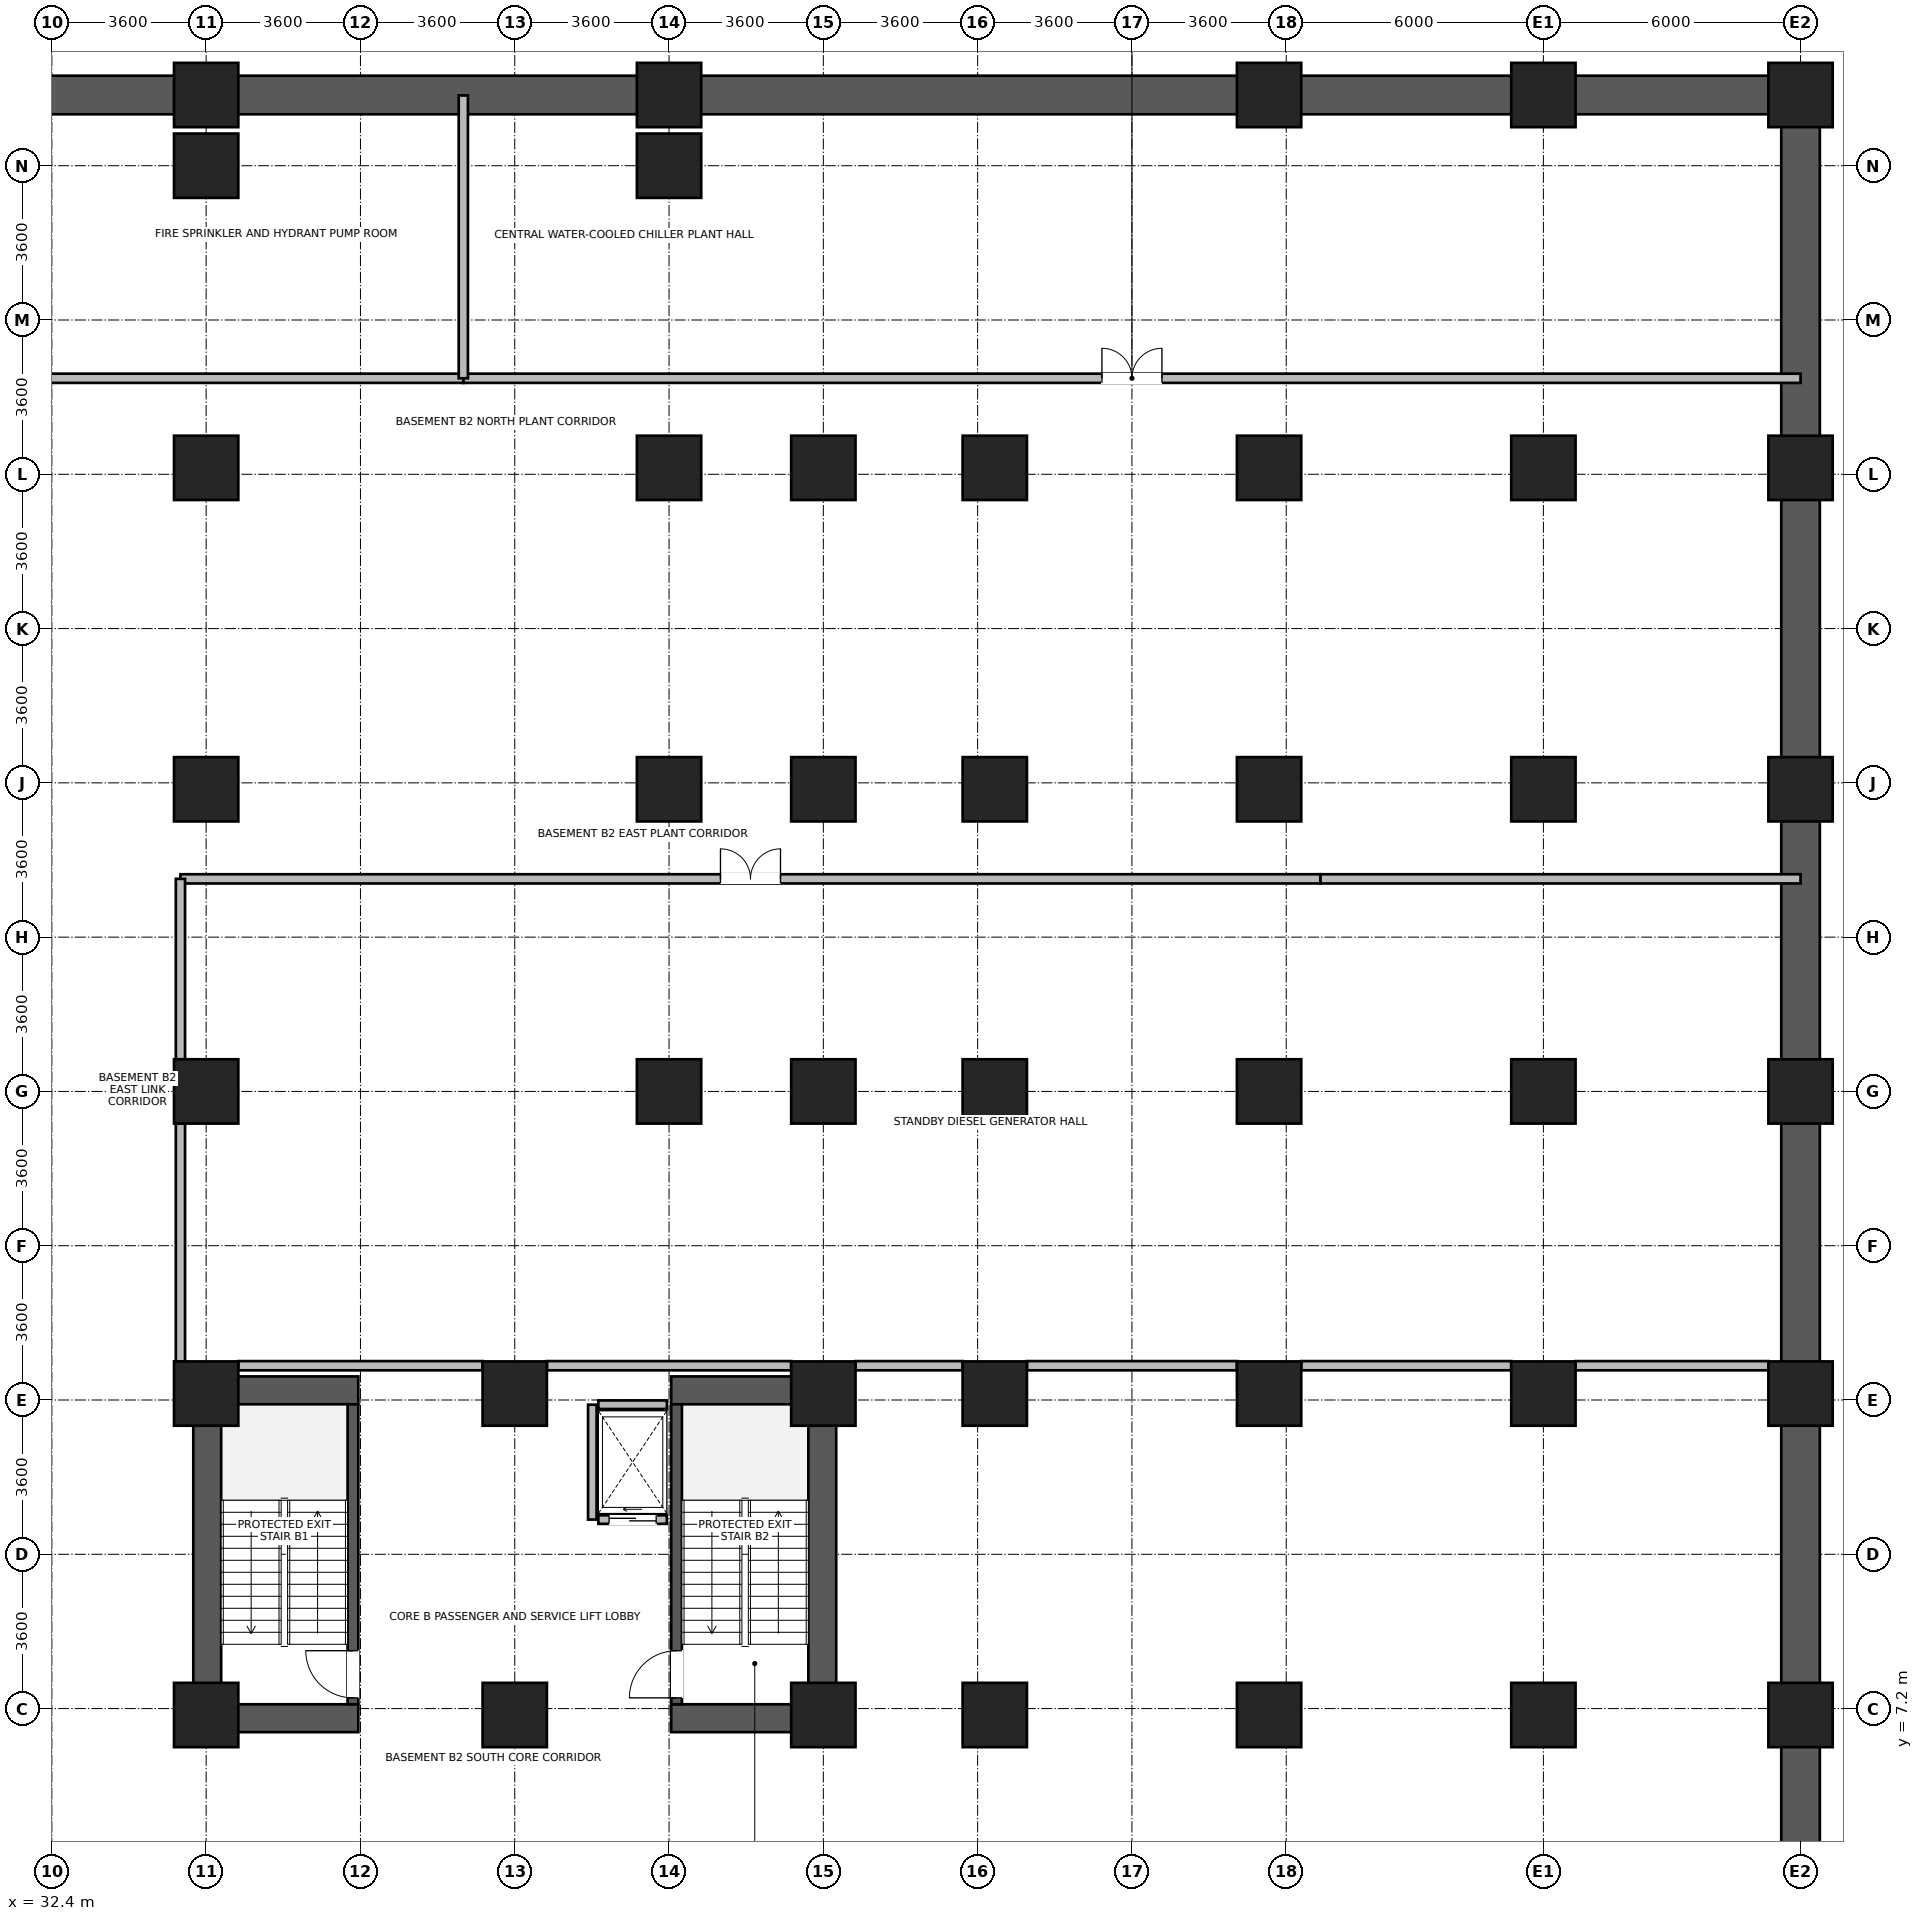
"""IFC4 building model, lengths in metres.
Left out: names, types, materials, properties, quantities, classifications, styles, units other than length and angle.
Written with IfcOpenShell. Run it as: python <this file> out.ifc"""

import sys

from ifc_helpers import new_model, si_unit, direction, frame, frame_2d, origin, origin_2d, place, context, subcontext, project, spatial, rectangle, extrude, source, transform, mapped, element, fill, save


model = new_model("IFC4")
c1 = context("Model", 3, precision=1e-05, world=origin(), true_north=direction((0.0, 1.0)))
c2 = subcontext(c1, "Body", "Model", "MODEL_VIEW")
j1 = project(units=[si_unit("LENGTHUNIT", "METRE"), si_unit("PLANEANGLEUNIT", "RADIAN")], contexts=[c1])
p1 = place(None, origin())
s1 = spatial("IfcSite", under=j1, at=p1, CompositionType="ELEMENT")
p2 = place(p1, origin())
s2 = spatial("IfcBuilding", under=s1, at=p2, CompositionType="ELEMENT")
p3 = place(p2, frame((0.0, 0.0, -9.0)))
s3 = spatial("IfcBuildingStorey", under=s2, at=p3, CompositionType="ELEMENT", Elevation=-9.0)
p4 = place(p3, frame((-12.45, 44.85, 0.0), z_axis=(0.0, 0.0, 1.0), x_axis=(1.0, 0.0, 0.0)))
e1 = element("IfcWall", 1, at=p4, inside=s3, PredefinedType="USERDEFINED", context=c2, shape_type="SweptSolid", body=[
    extrude(rectangle(XDim=86.1, YDim=0.9, at=frame_2d((43.05, 0.0))), origin(), (0.0, 0.0, 1.0), 4.18),
])
p5 = place(p3, frame((73.2, 2.25, 0.0), z_axis=(0.0, 0.0, 1.0), x_axis=(0.0, 1.0, 0.0)))
e2 = element("IfcWall", 2, at=p5, inside=s3, PredefinedType="USERDEFINED", context=c2, shape_type="SweptSolid", body=[
    extrude(rectangle(XDim=42.15, YDim=0.9, at=frame_2d((21.075, 0.0))), origin(), (0.0, 0.0, 1.0), 4.18),
])
for number, where, z_axis, x_axis in (
    (3, (36.025, 6.65, 0.0), (0.0, 0.0, 1.0), (0.0, 1.0, 0.0)),
    (4, (50.375, 6.65, 0.0), (0.0, 0.0, 1.0), (0.0, 1.0, 0.0)),
):
    element("IfcWall", number, at=place(p3, frame(where, z_axis=z_axis, x_axis=x_axis)), inside=s3, PredefinedType="SHEAR", context=c2, shape_type="SweptSolid", body=[
        extrude(rectangle(XDim=8.3, YDim=0.65, at=frame_2d((4.15, 0.0))), origin(), (0.0, 0.0, 1.0), 4.18),
    ])
for number, where, z_axis, x_axis in (
    (5, (36.35, 6.975, 0.0), (0.0, 0.0, 1.0), (1.0, 0.0, 0.0)),
    (6, (46.85, 6.975, 0.0), (0.0, 0.0, 1.0), (1.0, 0.0, 0.0)),
    (7, (36.35, 14.625, 0.0), (0.0, 0.0, 1.0), (1.0, 0.0, 0.0)),
    (8, (46.85, 14.625, 0.0), (0.0, 0.0, 1.0), (1.0, 0.0, 0.0)),
):
    element("IfcWall", number, at=place(p3, frame(where, z_axis=z_axis, x_axis=x_axis)), inside=s3, PredefinedType="SHEAR", context=c2, shape_type="SweptSolid", body=[
        extrude(rectangle(XDim=3.2, YDim=0.65, at=frame_2d((1.6, 0.0))), origin(), (0.0, 0.0, 1.0), 4.18),
    ])
p6 = place(p3, frame((39.425, 7.3, 0.0), z_axis=(0.0, 0.0, 1.0), x_axis=(0.0, 1.0, 0.0)))
e9 = element("IfcWall", 9, at=p6, inside=s3, PredefinedType="SHEAR", context=c2, shape_type="SweptSolid", body=[
    extrude(rectangle(XDim=7.0, YDim=0.25, at=frame_2d((3.5, 0.0))), origin(), (0.0, 0.0, 1.0), 4.18),
])
p7 = place(p6, frame((0.15, 0.0, 0.0)))
e10 = element("IfcOpeningElement", 10, at=p7, cuts=e9, PredefinedType="OPENING", context=c2, shape_type="SweptSolid", body=[
    extrude(rectangle(XDim=1.1, YDim=2.08, at=frame_2d((0.55, 1.04))), frame((0.0, 0.135, 0.0), z_axis=(0.0, -1.0, 0.0), x_axis=(1.0, 0.0, 0.0)), (0.0, 0.0, 1.0), 0.27),
])
p8 = place(p3, frame((46.975, 7.3, 0.0), z_axis=(0.0, 0.0, 1.0), x_axis=(0.0, 1.0, 0.0)))
e11 = element("IfcWall", 11, at=p8, inside=s3, PredefinedType="SHEAR", context=c2, shape_type="SweptSolid", body=[
    extrude(rectangle(XDim=7.0, YDim=0.25, at=frame_2d((3.5, 0.0))), origin(), (0.0, 0.0, 1.0), 4.18),
])
p9 = place(p8, frame((0.15, 0.0, 0.0)))
e12 = element("IfcOpeningElement", 12, at=p9, cuts=e11, PredefinedType="OPENING", context=c2, shape_type="SweptSolid", body=[
    extrude(rectangle(XDim=1.1, YDim=2.08, at=frame_2d((0.55, 1.04))), frame((0.0, 0.135, 0.0), z_axis=(0.0, -1.0, 0.0), x_axis=(1.0, 0.0, 0.0)), (0.0, 0.0, 1.0), 0.27),
])
m1 = source(origin(), c2, "Body", "SweptSolid", [
    extrude(rectangle(XDim=1.5, YDim=1.5, at=origin_2d()), origin(), (0.0, 0.0, 1.0), 4.5),
])
for number, where, z_axis, x_axis in (
    (13, (36.0, 21.6, 0.0), (0.0, 0.0, 1.0), (1.0, 0.0, 0.0)),
    (14, (36.0, 43.2, 0.0), (0.0, 0.0, 1.0), (1.0, 0.0, 0.0)),
    (15, (36.0, 28.65, 0.0), (0.0, 0.0, 1.0), (1.0, 0.0, 0.0)),
    (16, (36.0, 36.15, 0.0), (0.0, 0.0, 1.0), (1.0, 0.0, 0.0)),
    (17, (46.8, 21.6, 0.0), (0.0, 0.0, 1.0), (1.0, 0.0, 0.0)),
    (18, (46.8, 28.65, 0.0), (0.0, 0.0, 1.0), (1.0, 0.0, 0.0)),
    (19, (46.8, 36.15, 0.0), (0.0, 0.0, 1.0), (1.0, 0.0, 0.0)),
    (20, (46.8, 43.2, 0.0), (0.0, 0.0, 1.0), (1.0, 0.0, 0.0)),
    (21, (36.0, 7.05, 0.0), (0.0, 0.0, 1.0), (1.0, 0.0, 0.0)),
    (22, (36.0, 14.55, 0.0), (0.0, 0.0, 1.0), (1.0, 0.0, 0.0)),
    (23, (43.2, 7.05, 0.0), (0.0, 0.0, 1.0), (1.0, 0.0, 0.0)),
    (24, (43.2, 14.55, 0.0), (0.0, 0.0, 1.0), (1.0, 0.0, 0.0)),
    (25, (50.4, 7.05, 0.0), (0.0, 0.0, 1.0), (1.0, 0.0, 0.0)),
    (26, (50.4, 14.55, 0.0), (0.0, 0.0, 1.0), (1.0, 0.0, 0.0)),
    (27, (50.4, 21.6, 0.0), (0.0, 0.0, 1.0), (1.0, 0.0, 0.0)),
    (28, (50.4, 28.65, 0.0), (0.0, 0.0, 1.0), (1.0, 0.0, 0.0)),
    (29, (50.4, 36.15, 0.0), (0.0, 0.0, 1.0), (1.0, 0.0, 0.0)),
    (30, (54.4, 7.05, 0.0), (0.0, 0.0, 1.0), (1.0, 0.0, 0.0)),
    (31, (54.4, 14.55, 0.0), (0.0, 0.0, 1.0), (1.0, 0.0, 0.0)),
    (32, (54.4, 21.6, 0.0), (0.0, 0.0, 1.0), (1.0, 0.0, 0.0)),
    (33, (54.4, 28.65, 0.0), (0.0, 0.0, 1.0), (1.0, 0.0, 0.0)),
    (34, (54.4, 36.15, 0.0), (0.0, 0.0, 1.0), (1.0, 0.0, 0.0)),
    (35, (36.0, 44.85, 0.0), (0.0, 0.0, 1.0), (1.0, 0.0, 0.0)),
    (36, (46.8, 44.85, 0.0), (0.0, 0.0, 1.0), (1.0, 0.0, 0.0)),
    (37, (60.8, 44.85, 0.0), (0.0, 0.0, 1.0), (1.0, 0.0, 0.0)),
    (38, (60.8, 36.15, 0.0), (0.0, 0.0, 1.0), (1.0, 0.0, 0.0)),
    (39, (60.8, 28.65, 0.0), (0.0, 0.0, 1.0), (1.0, 0.0, 0.0)),
    (40, (60.8, 21.6, 0.0), (0.0, 0.0, 1.0), (1.0, 0.0, 0.0)),
    (41, (60.8, 14.55, 0.0), (0.0, 0.0, 1.0), (1.0, 0.0, 0.0)),
    (42, (60.8, 7.05, 0.0), (0.0, 0.0, 1.0), (1.0, 0.0, 0.0)),
    (43, (67.2, 7.05, 0.0), (0.0, 0.0, 1.0), (1.0, 0.0, 0.0)),
    (44, (67.2, 14.55, 0.0), (0.0, 0.0, 1.0), (1.0, 0.0, 0.0)),
    (45, (67.2, 21.6, 0.0), (0.0, 0.0, 1.0), (1.0, 0.0, 0.0)),
    (46, (67.2, 28.65, 0.0), (0.0, 0.0, 1.0), (1.0, 0.0, 0.0)),
    (47, (67.2, 36.15, 0.0), (0.0, 0.0, 1.0), (1.0, 0.0, 0.0)),
    (48, (67.2, 44.85, 0.0), (0.0, 0.0, 1.0), (1.0, 0.0, 0.0)),
    (49, (73.2, 7.05, 0.0), (0.0, 0.0, 1.0), (1.0, 0.0, 0.0)),
    (50, (73.2, 14.55, 0.0), (0.0, 0.0, 1.0), (1.0, 0.0, 0.0)),
    (51, (73.2, 21.6, 0.0), (0.0, 0.0, 1.0), (1.0, 0.0, 0.0)),
    (52, (73.2, 28.65, 0.0), (0.0, 0.0, 1.0), (1.0, 0.0, 0.0)),
    (53, (73.2, 36.15, 0.0), (0.0, 0.0, 1.0), (1.0, 0.0, 0.0)),
    (54, (73.2, 44.85, 0.0), (0.0, 0.0, 1.0), (1.0, 0.0, 0.0)),
):
    element("IfcColumn", number, at=place(p3, frame(where, z_axis=z_axis, x_axis=x_axis)), inside=s3, PredefinedType="COLUMN", context=c2, shape_type="MappedRepresentation", body=[
        mapped(m1, transform((0.0, 0.0, 0.0), x_axis=(1.0, 0.0, 0.0), y_axis=(0.0, 1.0, 0.0), z_axis=(0.0, 0.0, 1.0), scale=1.0)),
    ])
p10 = place(p3, frame((45.15, 11.61, 0.0), z_axis=(0.0, 0.0, 1.0), x_axis=(1.0, 0.0, 0.0)))
e55 = element("IfcWall", 55, at=p10, inside=s3, PredefinedType="PARTITIONING", context=c2, shape_type="SweptSolid", body=[
    extrude(rectangle(XDim=1.6, YDim=0.2, at=frame_2d((0.8, 0.0))), origin(), (0.0, 0.0, 1.0), 4.16),
])
p11 = place(p10, frame((0.25, 0.0, 0.0)))
e56 = element("IfcOpeningElement", 56, at=p11, cuts=e55, PredefinedType="OPENING", context=c2, shape_type="SweptSolid", body=[
    extrude(rectangle(XDim=1.1, YDim=2.12, at=frame_2d((0.55, 1.06))), frame((0.0, 0.11, 0.0), z_axis=(0.0, -1.0, 0.0), x_axis=(1.0, 0.0, 0.0)), (0.0, 0.0, 1.0), 0.22),
])
p12 = place(p3, frame((45.15, 14.29, 0.0), z_axis=(0.0, 0.0, 1.0), x_axis=(1.0, 0.0, 0.0)))
e57 = element("IfcWall", 57, at=p12, inside=s3, PredefinedType="PARTITIONING", context=c2, shape_type="SweptSolid", body=[
    extrude(rectangle(XDim=1.6, YDim=0.2, at=frame_2d((0.8, 0.0))), origin(), (0.0, 0.0, 1.0), 2.96),
])
p13 = place(p3, frame((45.01, 11.61, 0.0), z_axis=(0.0, 0.0, 1.0), x_axis=(0.0, 1.0, 0.0)))
e58 = element("IfcWall", 58, at=p13, inside=s3, PredefinedType="PARTITIONING", context=c2, shape_type="SweptSolid", body=[
    extrude(rectangle(XDim=2.68, YDim=0.2, at=frame_2d((1.34, 0.0))), origin(), (0.0, 0.0, 1.0), 4.16),
])
p14 = place(p3, frame((42.0, 38.24, 0.0), z_axis=(0.0, 0.0, 1.0), x_axis=(1.0, 0.0, 0.0)))
e59 = element("IfcWall", 59, at=p14, inside=s3, PredefinedType="PARTITIONING", context=c2, shape_type="SweptSolid", body=[
    extrude(rectangle(XDim=31.2, YDim=0.215, at=frame_2d((15.6, 0.0))), origin(), (0.0, 0.0, 1.0), 4.16),
])
p15 = place(p14, frame((14.9, 0.0, 0.0)))
e60 = element("IfcOpeningElement", 60, at=p15, cuts=e59, PredefinedType="OPENING", context=c2, shape_type="SweptSolid", body=[
    extrude(rectangle(XDim=1.4, YDim=2.15, at=frame_2d((0.7, 1.075))), frame((0.0, 0.118, 0.0), z_axis=(0.0, -1.0, 0.0), x_axis=(1.0, 0.0, 0.0)), (0.0, 0.0, 1.0), 0.235),
])
p16 = place(p3, frame((35.4, 26.56, 0.0), z_axis=(0.0, 0.0, 1.0), x_axis=(1.0, 0.0, 0.0)))
e61 = element("IfcWall", 61, at=p16, inside=s3, PredefinedType="PARTITIONING", context=c2, shape_type="SweptSolid", body=[
    extrude(rectangle(XDim=26.6, YDim=0.215, at=frame_2d((13.3, 0.0))), origin(), (0.0, 0.0, 1.0), 4.16),
])
p17 = place(p16, frame((12.6, 0.0, 0.0)))
e62 = element("IfcOpeningElement", 62, at=p17, cuts=e61, PredefinedType="OPENING", context=c2, shape_type="SweptSolid", body=[
    extrude(rectangle(XDim=1.4, YDim=2.15, at=frame_2d((0.7, 1.075))), frame((0.0, 0.118, 0.0), z_axis=(0.0, -1.0, 0.0), x_axis=(1.0, 0.0, 0.0)), (0.0, 0.0, 1.0), 0.235),
])
p18 = place(p3, frame((18.0, 38.24, 0.0), z_axis=(0.0, 0.0, 1.0), x_axis=(1.0, 0.0, 0.0)))
e63 = element("IfcWall", 63, at=p18, inside=s3, PredefinedType="PARTITIONING", context=c2, shape_type="SweptSolid", body=[
    extrude(rectangle(XDim=24.0, YDim=0.215, at=frame_2d((12.0, 0.0))), origin(), (0.0, 0.0, 1.0), 4.16),
])
p19 = place(p18, frame((11.3, 0.0, 0.0)))
e64 = element("IfcOpeningElement", 64, at=p19, cuts=e63, PredefinedType="OPENING", context=c2, shape_type="SweptSolid", body=[
    extrude(rectangle(XDim=1.4, YDim=2.15, at=frame_2d((0.7, 1.075))), frame((0.0, 0.118, 0.0), z_axis=(0.0, -1.0, 0.0), x_axis=(1.0, 0.0, 0.0)), (0.0, 0.0, 1.0), 0.235),
])
p20 = place(p3, frame((35.4, 15.3, 0.0), z_axis=(0.0, 0.0, 1.0), x_axis=(0.0, 1.0, 0.0)))
e65 = element("IfcWall", 65, at=p20, inside=s3, PredefinedType="PARTITIONING", context=c2, shape_type="SweptSolid", body=[
    extrude(rectangle(XDim=5.55, YDim=0.215, at=frame_2d((2.775, 0.0))), origin(), (0.0, 0.0, 1.0), 4.16),
])
p21 = place(p3, frame((35.4, 22.35, 0.0), z_axis=(0.0, 0.0, 1.0), x_axis=(0.0, 1.0, 0.0)))
e66 = element("IfcWall", 66, at=p21, inside=s3, PredefinedType="PARTITIONING", context=c2, shape_type="SweptSolid", body=[
    extrude(rectangle(XDim=4.21, YDim=0.215, at=frame_2d((2.105, 0.0))), origin(), (0.0, 0.0, 1.0), 4.16),
])
for number, where, z_axis, x_axis in (
    (67, (36.75, 15.2, 0.0), (0.0, 0.0, 1.0), (1.0, 0.0, 0.0)),
    (68, (43.95, 15.2, 0.0), (0.0, 0.0, 1.0), (1.0, 0.0, 0.0)),
):
    element("IfcWall", number, at=place(p3, frame(where, z_axis=z_axis, x_axis=x_axis)), inside=s3, PredefinedType="PARTITIONING", context=c2, shape_type="SweptSolid", body=[
        extrude(rectangle(XDim=5.7, YDim=0.215, at=frame_2d((2.85, 0.0))), origin(), (0.0, 0.0, 1.0), 4.16),
    ])
p22 = place(p3, frame((51.15, 15.2, 0.0), z_axis=(0.0, 0.0, 1.0), x_axis=(1.0, 0.0, 0.0)))
e69 = element("IfcWall", 69, at=p22, inside=s3, PredefinedType="PARTITIONING", context=c2, shape_type="SweptSolid", body=[
    extrude(rectangle(XDim=2.5, YDim=0.215, at=frame_2d((1.25, 0.0))), origin(), (0.0, 0.0, 1.0), 4.16),
])
p23 = place(p3, frame((55.15, 15.2, 0.0), z_axis=(0.0, 0.0, 1.0), x_axis=(1.0, 0.0, 0.0)))
e70 = element("IfcWall", 70, at=p23, inside=s3, PredefinedType="PARTITIONING", context=c2, shape_type="SweptSolid", body=[
    extrude(rectangle(XDim=4.9, YDim=0.215, at=frame_2d((2.45, 0.0))), origin(), (0.0, 0.0, 1.0), 4.16),
])
p24 = place(p3, frame((61.55, 15.2, 0.0), z_axis=(0.0, 0.0, 1.0), x_axis=(1.0, 0.0, 0.0)))
e71 = element("IfcWall", 71, at=p24, inside=s3, PredefinedType="PARTITIONING", context=c2, shape_type="SweptSolid", body=[
    extrude(rectangle(XDim=4.9, YDim=0.215, at=frame_2d((2.45, 0.0))), origin(), (0.0, 0.0, 1.0), 4.16),
])
p25 = place(p3, frame((67.95, 15.2, 0.0), z_axis=(0.0, 0.0, 1.0), x_axis=(1.0, 0.0, 0.0)))
e72 = element("IfcWall", 72, at=p25, inside=s3, PredefinedType="PARTITIONING", context=c2, shape_type="SweptSolid", body=[
    extrude(rectangle(XDim=4.5, YDim=0.215, at=frame_2d((2.25, 0.0))), origin(), (0.0, 0.0, 1.0), 4.16),
])
p26 = place(p3, frame((62.0, 26.56, 0.0), z_axis=(0.0, 0.0, 1.0), x_axis=(1.0, 0.0, 0.0)))
e73 = element("IfcWall", 73, at=p26, inside=s3, PredefinedType="PARTITIONING", context=c2, shape_type="SweptSolid", body=[
    extrude(rectangle(XDim=11.2, YDim=0.215, at=frame_2d((5.6, 0.0))), origin(), (0.0, 0.0, 1.0), 4.16),
])
p27 = place(p3, frame((42.0, 38.24, 0.0), z_axis=(0.0, 0.0, 1.0), x_axis=(0.0, 1.0, 0.0)))
e74 = element("IfcWall", 74, at=p27, inside=s3, PredefinedType="PARTITIONING", context=c2, shape_type="SweptSolid", body=[
    extrude(rectangle(XDim=6.6, YDim=0.215, at=frame_2d((3.3, 0.0))), origin(), (0.0, 0.0, 1.0), 4.16),
])
p28 = place(p7, origin())
e75 = element("IfcDoor", 75, at=p28, inside=s3, OperationType="SINGLE_SWING_RIGHT", PredefinedType="DOOR", context=c2, shape_type="SweptSolid", body=[
    extrude(rectangle(XDim=1.1, YDim=2.08, at=frame_2d((0.55, 1.04))), frame((0.0, 0.025, 0.0), z_axis=(0.0, -1.0, 0.0), x_axis=(1.0, 0.0, 0.0)), (0.0, 0.0, 1.0), 0.05),
])
fill(e10, e75)
p29 = place(p9, origin())
e76 = element("IfcDoor", 76, at=p29, inside=s3, OperationType="SINGLE_SWING_LEFT", PredefinedType="DOOR", context=c2, shape_type="SweptSolid", body=[
    extrude(rectangle(XDim=1.1, YDim=2.08, at=frame_2d((0.55, 1.04))), frame((0.0, 0.025, 0.0), z_axis=(0.0, -1.0, 0.0), x_axis=(1.0, 0.0, 0.0)), (0.0, 0.0, 1.0), 0.05),
])
fill(e12, e76)
p30 = place(p11, origin())
e77 = element("IfcDoor", 77, at=p30, inside=s3, OperationType="SLIDING_TO_LEFT", PredefinedType="DOOR", context=c2, shape_type="SweptSolid", body=[
    extrude(rectangle(XDim=1.1, YDim=2.12, at=frame_2d((0.55, 1.06))), frame((0.0, 0.025, 0.0), z_axis=(0.0, -1.0, 0.0), x_axis=(1.0, 0.0, 0.0)), (0.0, 0.0, 1.0), 0.05),
])
fill(e56, e77)
p31 = place(p15, origin())
e78 = element("IfcDoor", 78, at=p31, inside=s3, OperationType="DOUBLE_DOOR_SINGLE_SWING", PredefinedType="DOOR", context=c2, shape_type="SweptSolid", body=[
    extrude(rectangle(XDim=1.4, YDim=2.15, at=frame_2d((0.7, 1.075))), frame((0.0, 0.025, 0.0), z_axis=(0.0, -1.0, 0.0), x_axis=(1.0, 0.0, 0.0)), (0.0, 0.0, 1.0), 0.05),
])
fill(e60, e78)
p32 = place(p17, origin())
e79 = element("IfcDoor", 79, at=p32, inside=s3, OperationType="DOUBLE_DOOR_SINGLE_SWING", PredefinedType="DOOR", context=c2, shape_type="SweptSolid", body=[
    extrude(rectangle(XDim=1.4, YDim=2.15, at=frame_2d((0.7, 1.075))), frame((0.0, 0.025, 0.0), z_axis=(0.0, -1.0, 0.0), x_axis=(1.0, 0.0, 0.0)), (0.0, 0.0, 1.0), 0.05),
])
fill(e62, e79)
save(model, sys.argv[1])
